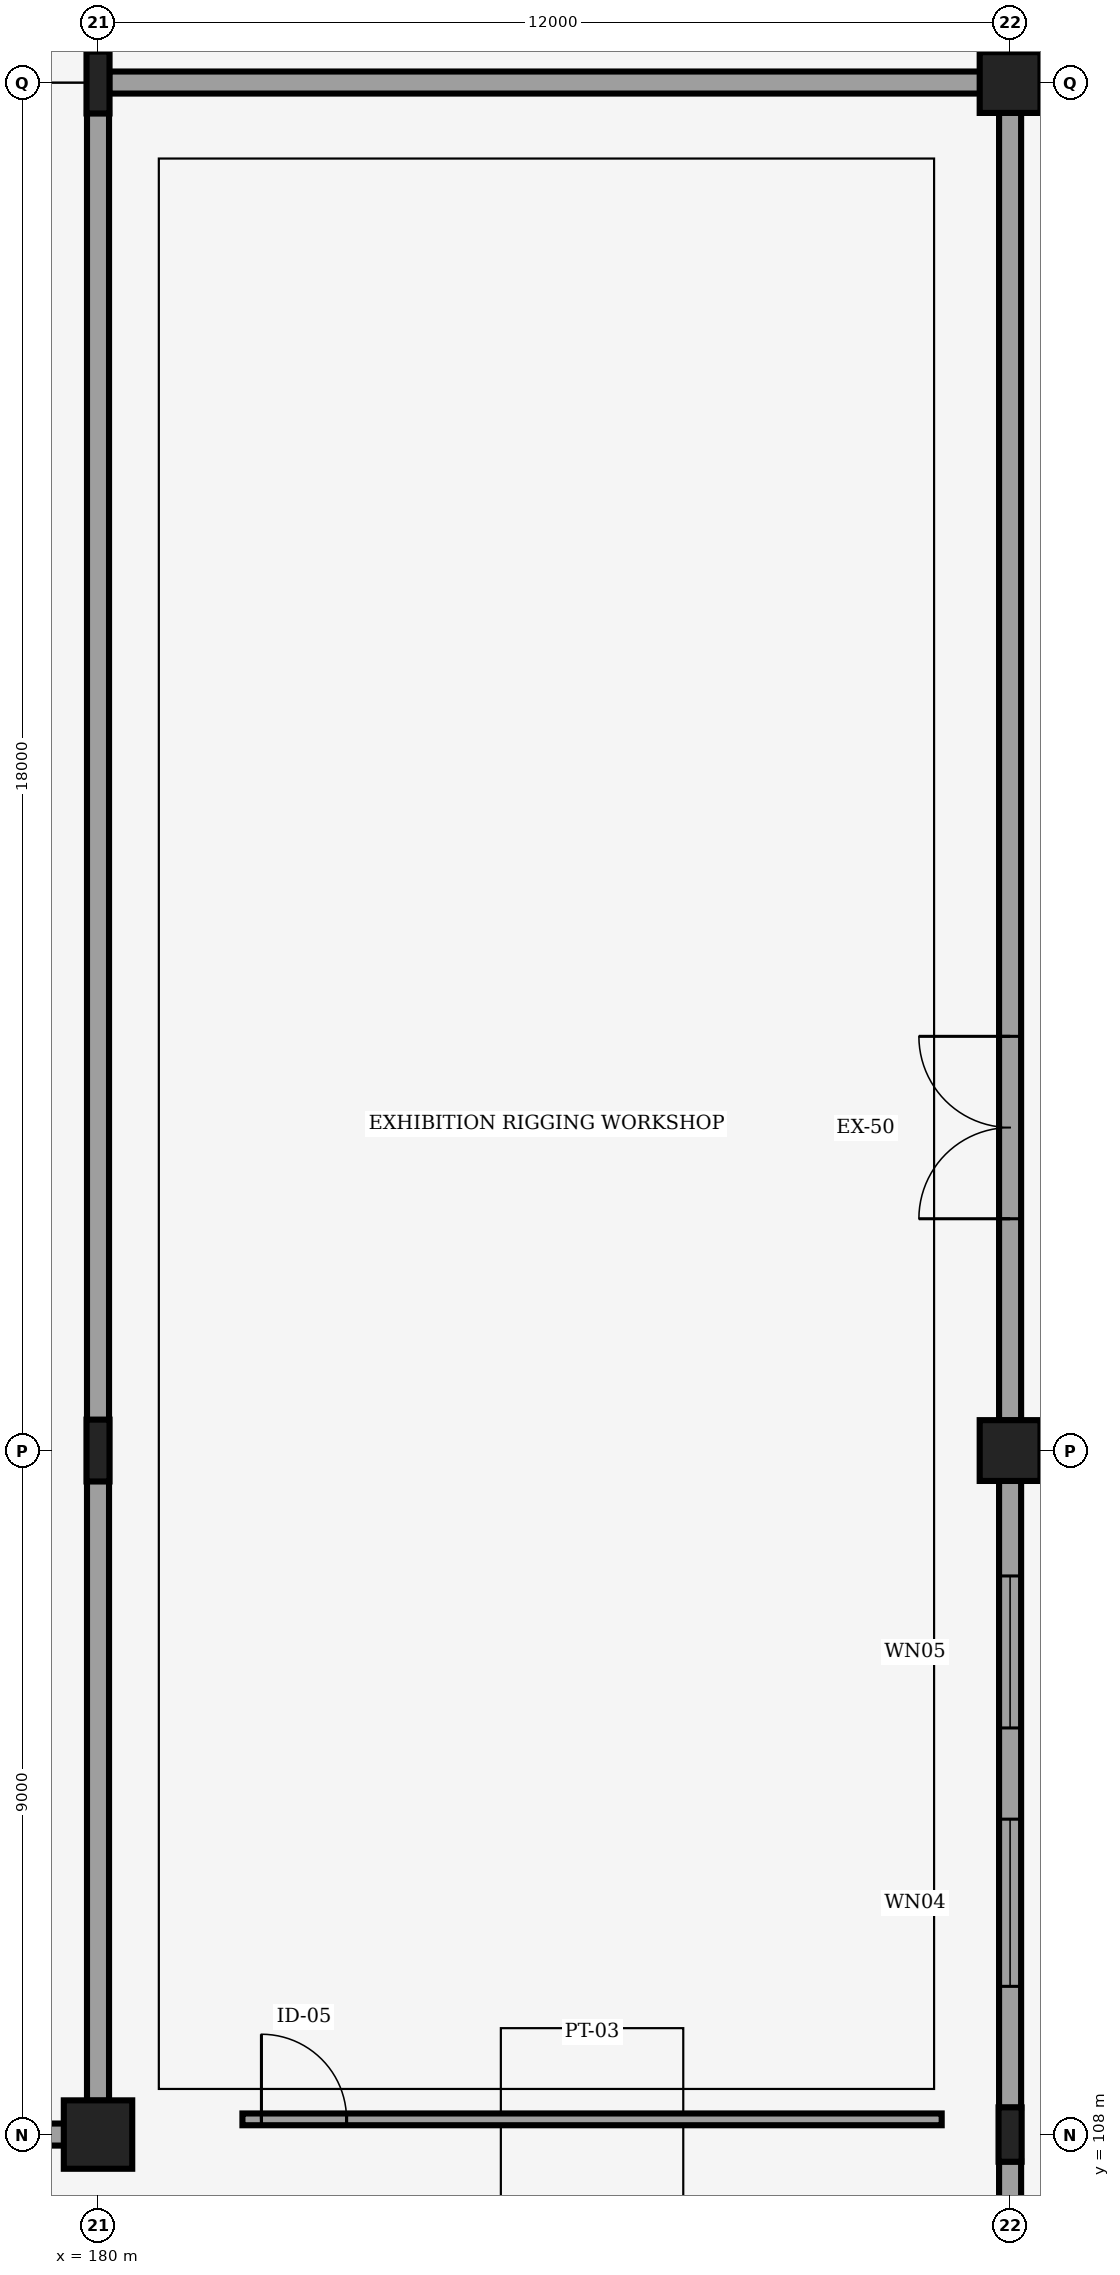
"""IFC4 building model, lengths in metres.
Left out: names, types, materials, properties, quantities, classifications, styles, units other than length and angle.
Written with IfcOpenShell. Run it as: python <this file> out.ifc"""

import sys

from ifc_helpers import new_model, si_unit, direction, frame, frame_2d, origin, origin_2d, place, context, subcontext, project, spatial, rectangle, i_section, extrude, element, fill, save


model = new_model("IFC4")
c1 = context("Model", 3, precision=1e-05, world=origin(), true_north=direction((0.0, 1.0)))
c2 = subcontext(c1, "Body", "Model", "MODEL_VIEW")
j1 = project(units=[si_unit("LENGTHUNIT", "METRE"), si_unit("PLANEANGLEUNIT", "RADIAN")], contexts=[c1])
p1 = place(None, origin())
s1 = spatial("IfcSite", under=j1, at=p1, CompositionType="ELEMENT")
p2 = place(p1, origin())
s2 = spatial("IfcBuilding", under=s1, at=p2, CompositionType="ELEMENT")
p3 = place(p2, origin())
s3 = spatial("IfcBuildingStorey", under=s2, at=p3, CompositionType="ELEMENT", Elevation=0.0)
p4 = place(p3, frame((180.0, 108.0, 0.0), z_axis=(0.0, 0.0, 1.0), x_axis=(1.0, 0.0, 0.0)))
e1 = element("IfcColumn", 1, at=p4, inside=s3, PredefinedType="COLUMN", context=c2, shape_type="SweptSolid", body=[
    extrude(rectangle(XDim=0.9, YDim=0.9, at=origin_2d()), origin(), (0.0, 0.0, 1.0), 6.0),
])
for number, where, z_axis, x_axis in (
    (2, (180.0, 117.0, 0.0), (0.0, 0.0, 1.0), (1.0, 0.0, 0.0)),
    (3, (180.0, 135.0, 0.0), (0.0, 0.0, 1.0), (1.0, 0.0, 0.0)),
):
    element("IfcColumn", number, at=place(p3, frame(where, z_axis=z_axis, x_axis=x_axis)), inside=s3, PredefinedType="COLUMN", context=c2, shape_type="SweptSolid", body=[
        extrude(i_section(OverallWidth=0.303, OverallDepth=0.814, WebThickness=0.021, FlangeThickness=0.04, FilletRadius=0.03, at=origin_2d()), origin(), (0.0, 0.0, 1.0), 6.0),
    ])
p5 = place(p3, frame((192.0, 108.0, 0.0), z_axis=(0.0, 0.0, 1.0), x_axis=(1.0, 0.0, 0.0)))
e4 = element("IfcColumn", 4, at=p5, inside=s3, PredefinedType="COLUMN", context=c2, shape_type="SweptSolid", body=[
    extrude(i_section(OverallWidth=0.304, OverallDepth=0.716, WebThickness=0.021, FlangeThickness=0.04, FilletRadius=0.027, at=origin_2d()), origin(), (0.0, 0.0, 1.0), 6.0),
])
for number, where, z_axis, x_axis in (
    (5, (192.0, 117.0, 0.0), (0.0, 0.0, 1.0), (1.0, 0.0, 0.0)),
    (6, (192.0, 135.0, 0.0), (0.0, 0.0, 1.0), (1.0, 0.0, 0.0)),
):
    element("IfcColumn", number, at=place(p3, frame(where, z_axis=z_axis, x_axis=x_axis)), inside=s3, PredefinedType="COLUMN", context=c2, shape_type="SweptSolid", body=[
        extrude(rectangle(XDim=0.8, YDim=0.8, at=origin_2d()), origin(), (0.0, 0.0, 1.0), 6.0),
    ])
p6 = place(p3, frame((192.0, 99.395, 0.0), z_axis=(0.0, 0.0, 1.0), x_axis=(0.0, 1.0, 0.0)))
e7 = element("IfcWall", 7, at=p6, inside=s3, PredefinedType="SOLIDWALL", context=c2, shape_type="SweptSolid", body=[
    extrude(rectangle(XDim=8.252, YDim=0.29, at=frame_2d((4.126, 0.0))), origin(), (0.0, 0.0, 1.0), 4.95),
])
p7 = place(p6, frame((2.655, 0.0, 0.0)))
e8 = element("IfcOpeningElement", 8, at=p7, cuts=e7, PredefinedType="OPENING", context=c2, shape_type="SweptSolid", body=[
    extrude(rectangle(XDim=2.5, YDim=2.5, at=frame_2d((1.25, 1.25))), frame((0.0, 0.155, 0.0), z_axis=(0.0, -1.0, 0.0), x_axis=(1.0, 0.0, 0.0)), (0.0, 0.0, 1.0), 0.31),
])
p8 = place(p3, frame((192.0, 108.353, 0.0), z_axis=(0.0, 0.0, 1.0), x_axis=(0.0, 1.0, 0.0)))
e9 = element("IfcWall", 9, at=p8, inside=s3, PredefinedType="SOLIDWALL", context=c2, shape_type="SweptSolid", body=[
    extrude(rectangle(XDim=8.252, YDim=0.29, at=frame_2d((4.126, 0.0))), origin(), (0.0, 0.0, 1.0), 4.95),
])
p9 = place(p8, frame((1.597, 0.0, 0.85)))
e10 = element("IfcOpeningElement", 10, at=p9, cuts=e9, PredefinedType="OPENING", context=c2, shape_type="SweptSolid", body=[
    extrude(rectangle(XDim=2.2, YDim=2.1, at=frame_2d((1.1, 1.05))), frame((0.0, 0.155, 0.0), z_axis=(0.0, -1.0, 0.0), x_axis=(1.0, 0.0, 0.0)), (0.0, 0.0, 1.0), 0.31),
])
p10 = place(p8, frame((4.997, 0.0, 0.85)))
e11 = element("IfcOpeningElement", 11, at=p10, cuts=e9, PredefinedType="OPENING", context=c2, shape_type="SweptSolid", body=[
    extrude(rectangle(XDim=2.0, YDim=2.1, at=frame_2d((1.0, 1.05))), frame((0.0, 0.155, 0.0), z_axis=(0.0, -1.0, 0.0), x_axis=(1.0, 0.0, 0.0)), (0.0, 0.0, 1.0), 0.31),
])
p11 = place(p3, frame((192.0, 117.395, 0.0), z_axis=(0.0, 0.0, 1.0), x_axis=(0.0, 1.0, 0.0)))
e12 = element("IfcWall", 12, at=p11, inside=s3, PredefinedType="SOLIDWALL", context=c2, shape_type="SweptSolid", body=[
    extrude(rectangle(XDim=17.21, YDim=0.29, at=frame_2d((8.605, 0.0))), origin(), (0.0, 0.0, 1.0), 4.95),
])
p12 = place(p11, frame((2.655, 0.0, 0.0)))
e13 = element("IfcOpeningElement", 13, at=p12, cuts=e12, PredefinedType="OPENING", context=c2, shape_type="SweptSolid", body=[
    extrude(rectangle(XDim=2.4, YDim=2.45, at=frame_2d((1.2, 1.225))), frame((0.0, 0.155, 0.0), z_axis=(0.0, -1.0, 0.0), x_axis=(1.0, 0.0, 0.0)), (0.0, 0.0, 1.0), 0.31),
])
p13 = place(p3, frame((171.146, 108.0, 0.0), z_axis=(0.0, 0.0, 1.0), x_axis=(1.0, 0.0, 0.0)))
e14 = element("IfcWall", 14, at=p13, inside=s3, PredefinedType="SOLIDWALL", context=c2, shape_type="SweptSolid", body=[
    extrude(rectangle(XDim=8.408, YDim=0.29, at=frame_2d((4.204, 0.0))), origin(), (0.0, 0.0, 1.0), 4.95),
])
p14 = place(p13, frame((2.904, 0.0, 3.3)))
e15 = element("IfcOpeningElement", 15, at=p14, cuts=e14, PredefinedType="OPENING", context=c2, shape_type="SweptSolid", body=[
    extrude(rectangle(XDim=2.5, YDim=1.15, at=frame_2d((1.25, 0.575))), frame((0.0, 0.155, 0.0), z_axis=(0.0, -1.0, 0.0), x_axis=(1.0, 0.0, 0.0)), (0.0, 0.0, 1.0), 0.31),
])
p15 = place(p3, frame((180.146, 135.0, 0.0), z_axis=(0.0, 0.0, 1.0), x_axis=(1.0, 0.0, 0.0)))
e16 = element("IfcWall", 16, at=p15, inside=s3, PredefinedType="SOLIDWALL", context=c2, shape_type="SweptSolid", body=[
    extrude(rectangle(XDim=11.458, YDim=0.29, at=frame_2d((5.729, 0.0))), origin(), (0.0, 0.0, 1.0), 4.95),
])
p16 = place(p3, frame((180.0, 108.445, 0.0), z_axis=(0.0, 0.0, 1.0), x_axis=(0.0, 1.0, 0.0)))
e17 = element("IfcWall", 17, at=p16, inside=s3, PredefinedType="SOLIDWALL", context=c2, shape_type="SweptSolid", body=[
    extrude(rectangle(XDim=26.153, YDim=0.29, at=frame_2d((13.076, 0.0))), origin(), (0.0, 0.0, 1.0), 4.95),
])
p17 = place(p3, frame((181.9, 108.2, 0.0), z_axis=(0.0, 0.0, 1.0), x_axis=(1.0, 0.0, 0.0)))
e18 = element("IfcWall", 18, at=p17, inside=s3, PredefinedType="PARTITIONING", context=c2, shape_type="SweptSolid", body=[
    extrude(rectangle(XDim=9.2, YDim=0.155, at=frame_2d((4.6, 0.0))), origin(), (0.0, 0.0, 1.0), 4.85),
])
p18 = place(p17, frame((0.25, 0.0, 0.0)))
e19 = element("IfcOpeningElement", 19, at=p18, cuts=e18, PredefinedType="OPENING", context=c2, shape_type="SweptSolid", body=[
    extrude(rectangle(XDim=1.12, YDim=2.2, at=frame_2d((0.56, 1.1))), frame((0.0, 0.087, 0.0), z_axis=(0.0, -1.0, 0.0), x_axis=(1.0, 0.0, 0.0)), (0.0, 0.0, 1.0), 0.175),
])
p19 = place(p9, origin())
e20 = element("IfcWindow", 20, at=p19, inside=s3, PartitioningType="SINGLE_PANEL", PredefinedType="WINDOW", context=c2, shape_type="SweptSolid", body=[
    extrude(rectangle(XDim=2.2, YDim=2.1, at=frame_2d((1.1, 1.05))), frame((0.0, 0.03, 0.0), z_axis=(0.0, -1.0, 0.0), x_axis=(1.0, 0.0, 0.0)), (0.0, 0.0, 1.0), 0.06),
])
fill(e10, e20)
p20 = place(p10, origin())
e21 = element("IfcWindow", 21, at=p20, inside=s3, PartitioningType="SINGLE_PANEL", PredefinedType="WINDOW", context=c2, shape_type="SweptSolid", body=[
    extrude(rectangle(XDim=2.0, YDim=2.1, at=frame_2d((1.0, 1.05))), frame((0.0, 0.03, 0.0), z_axis=(0.0, -1.0, 0.0), x_axis=(1.0, 0.0, 0.0)), (0.0, 0.0, 1.0), 0.06),
])
fill(e11, e21)
p21 = place(p12, origin())
e22 = element("IfcDoor", 22, at=p21, inside=s3, OperationType="DOUBLE_DOOR_SINGLE_SWING", PredefinedType="DOOR", context=c2, shape_type="SweptSolid", body=[
    extrude(rectangle(XDim=2.4, YDim=2.45, at=frame_2d((1.2, 1.225))), frame((0.0, 0.025, 0.0), z_axis=(0.0, -1.0, 0.0), x_axis=(1.0, 0.0, 0.0)), (0.0, 0.0, 1.0), 0.05),
])
fill(e13, e22)
p22 = place(p18, origin())
e23 = element("IfcDoor", 23, at=p22, inside=s3, OperationType="SINGLE_SWING_LEFT", PredefinedType="DOOR", context=c2, shape_type="SweptSolid", body=[
    extrude(rectangle(XDim=1.12, YDim=2.2, at=frame_2d((0.56, 1.1))), frame((0.0, 0.025, 0.0), z_axis=(0.0, -1.0, 0.0), x_axis=(1.0, 0.0, 0.0)), (0.0, 0.0, 1.0), 0.05),
])
fill(e19, e23)
save(model, sys.argv[1])
